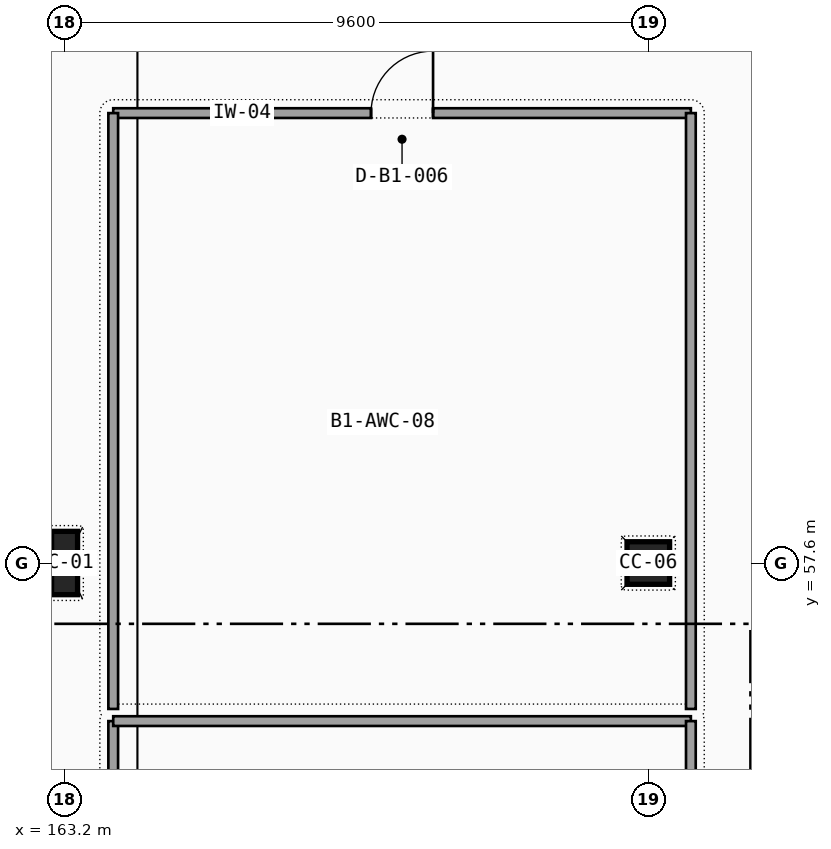
"""IFC4 building model, lengths in metres.
Left out: names, types, materials, properties, quantities, classifications, styles, units other than length and angle.
Written with IfcOpenShell. Run it as: python <this file> out.ifc"""

import sys

from ifc_helpers import new_model, si_unit, direction, frame, frame_2d, origin, origin_2d, place, context, subcontext, project, spatial, rectangle, i_section, extrude, element, fill, save


model = new_model("IFC4")
c1 = context("Model", 3, precision=1e-05, world=origin(), true_north=direction((0.0, 1.0)))
c2 = subcontext(c1, "Body", "Model", "MODEL_VIEW")
j1 = project(units=[si_unit("LENGTHUNIT", "METRE"), si_unit("PLANEANGLEUNIT", "RADIAN")], contexts=[c1])
p1 = place(None, origin())
s1 = spatial("IfcSite", under=j1, at=p1, CompositionType="ELEMENT")
p2 = place(p1, origin())
s2 = spatial("IfcBuilding", under=s1, at=p2, CompositionType="ELEMENT")
p3 = place(p2, frame((0.0, 0.0, -4.8)))
s3 = spatial("IfcBuildingStorey", under=s2, at=p3, CompositionType="ELEMENT", Elevation=-4.8)
p4 = place(p3, frame((163.2, 57.6, 0.0), z_axis=(0.0, 0.0, 1.0), x_axis=(1.0, 0.0, 0.0)))
e1 = element("IfcColumn", 1, at=p4, inside=s3, PredefinedType="COLUMN", context=c2, shape_type="SweptSolid", body=[
    extrude(i_section(OverallWidth=0.427, OverallDepth=1.042, WebThickness=0.031, FlangeThickness=0.056, FilletRadius=0.031, at=origin_2d()), origin(), (0.0, 0.0, 1.0), 4.8),
])
p5 = place(p3, frame((172.8, 57.6, 0.0), z_axis=(0.0, 0.0, 1.0), x_axis=(1.0, 0.0, 0.0)))
e2 = element("IfcColumn", 2, at=p5, inside=s3, PredefinedType="COLUMN", context=c2, shape_type="SweptSolid", body=[
    extrude(rectangle(XDim=0.7, YDim=0.7, at=origin_2d()), origin(), (0.0, 0.0, 1.0), 4.8),
])
p6 = place(p3, frame((164.0, 40.0, 0.0), z_axis=(0.0, 0.0, 1.0), x_axis=(0.0, 1.0, 0.0)))
e3 = element("IfcWall", 3, at=p6, inside=s3, PredefinedType="PARTITIONING", context=c2, shape_type="SweptSolid", body=[
    extrude(rectangle(XDim=15.0, YDim=0.16, at=frame_2d((7.5, 0.0))), origin(), (0.0, 0.0, 1.0), 3.654),
])
p7 = place(p3, frame((164.0, 55.0, 0.0), z_axis=(0.0, 0.0, 1.0), x_axis=(1.0, 0.0, 0.0)))
e4 = element("IfcWall", 4, at=p7, inside=s3, PredefinedType="PARTITIONING", context=c2, shape_type="SweptSolid", body=[
    extrude(rectangle(XDim=9.5, YDim=0.16, at=frame_2d((4.75, 0.0))), origin(), (0.0, 0.0, 1.0), 3.7),
])
p8 = place(p3, frame((173.5, 55.0, 0.0), z_axis=(0.0, 0.0, 1.0), x_axis=(0.0, -1.0, 0.0)))
e5 = element("IfcWall", 5, at=p8, inside=s3, PredefinedType="PARTITIONING", context=c2, shape_type="SweptSolid", body=[
    extrude(rectangle(XDim=6.78, YDim=0.16, at=frame_2d((3.39, 0.0))), origin(), (0.0, 0.0, 1.0), 3.6),
])
p9 = place(p3, frame((164.0, 65.0, 0.0), z_axis=(0.0, 0.0, 1.0), x_axis=(1.0, 0.0, 0.0)))
e6 = element("IfcWall", 6, at=p9, inside=s3, PredefinedType="PARTITIONING", context=c2, shape_type="SweptSolid", body=[
    extrude(rectangle(XDim=9.5, YDim=0.16, at=frame_2d((4.75, 0.0))), origin(), (0.0, 0.0, 1.0), 3.7),
])
p10 = place(p9, frame((4.24, 0.0, 0.0), z_axis=(0.0, 0.0, 1.0), x_axis=(1.0, 0.0, 0.0)))
e7 = element("IfcOpeningElement", 7, at=p10, cuts=e6, PredefinedType="OPENING", context=c2, shape_type="SweptSolid", body=[
    extrude(rectangle(XDim=1.02, YDim=2.15, at=frame_2d((0.51, 1.075))), frame((0.0, 0.09, 0.0), z_axis=(0.0, -1.0, 0.0), x_axis=(1.0, 0.0, 0.0)), (0.0, 0.0, 1.0), 0.18),
])
p11 = place(p3, frame((173.5, 65.0, 0.0), z_axis=(0.0, 0.0, 1.0), x_axis=(0.0, -1.0, 0.0)))
e8 = element("IfcWall", 8, at=p11, inside=s3, PredefinedType="PARTITIONING", context=c2, shape_type="SweptSolid", body=[
    extrude(rectangle(XDim=9.8, YDim=0.16, at=frame_2d((4.9, 0.0))), origin(), (0.0, 0.0, 1.0), 3.6),
])
p12 = place(p3, frame((164.0, 55.2, 0.0), z_axis=(0.0, 0.0, 1.0), x_axis=(0.0, 1.0, 0.0)))
e9 = element("IfcWall", 9, at=p12, inside=s3, PredefinedType="PARTITIONING", context=c2, shape_type="SweptSolid", body=[
    extrude(rectangle(XDim=9.8, YDim=0.16, at=frame_2d((4.9, 0.0))), origin(), (0.0, 0.0, 1.0), 3.654),
])
p13 = place(p10, origin())
e10 = element("IfcDoor", 10, at=p13, inside=s3, OperationType="SINGLE_SWING_RIGHT", PredefinedType="DOOR", context=c2, shape_type="SweptSolid", body=[
    extrude(rectangle(XDim=1.02, YDim=2.15, at=frame_2d((0.51, 1.075))), frame((0.0, 0.025, 0.0), z_axis=(0.0, -1.0, 0.0), x_axis=(1.0, 0.0, 0.0)), (0.0, 0.0, 1.0), 0.05),
])
fill(e7, e10)
save(model, sys.argv[1])
